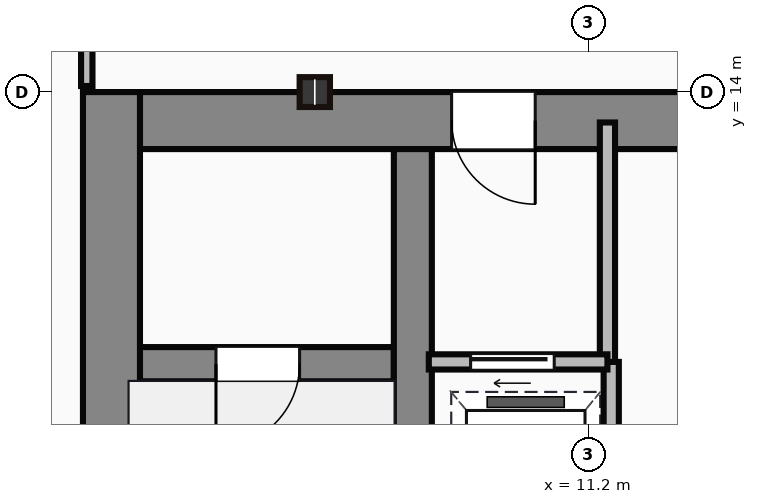
"""IFC4 building model, lengths in metres.
Left out: names, types, materials, properties, quantities, classifications, styles, units other than length and angle.
Written with IfcOpenShell. Run it as: python <this file> out.ifc"""

import sys

from ifc_helpers import new_model, si_unit, direction, frame, frame_2d, origin, origin_2d, place, context, subcontext, project, spatial, rectangle, i_section, extrude, source, transform, mapped, element, fill, save


model = new_model("IFC4")
c1 = context("Model", 3, precision=1e-05, world=origin(), true_north=direction((0.0, 1.0)))
c2 = subcontext(c1, "Body", "Model", "MODEL_VIEW")
j1 = project(units=[si_unit("LENGTHUNIT", "METRE"), si_unit("PLANEANGLEUNIT", "RADIAN")], contexts=[c1])
p1 = place(None, origin())
s1 = spatial("IfcSite", under=j1, at=p1, CompositionType="ELEMENT")
p2 = place(p1, origin())
s2 = spatial("IfcBuilding", under=s1, at=p2, CompositionType="ELEMENT")
p3 = place(p2, frame((0.0, 0.0, 106.9)))
s3 = spatial("IfcBuildingStorey", under=s2, at=p3, CompositionType="ELEMENT", Elevation=106.9)
m1 = source(origin(), c2, "Body", "SweptSolid", [
    extrude(rectangle(XDim=13.1, YDim=0.75, at=frame_2d((6.55, 0.0))), origin(), (0.0, 0.0, 1.0), 3.65),
])
p4 = place(p3, frame((4.925, 0.9, 0.0), z_axis=(0.0, 0.0, 1.0), x_axis=(0.0, 1.0, 0.0)))
e1 = element("IfcWall", 1, at=p4, inside=s3, PredefinedType="SHEAR", context=c2, shape_type="MappedRepresentation", body=[
    mapped(m1, transform((0.0, 0.0, 0.0))),
])
m2 = source(origin(), c2, "Body", "SweptSolid", [
    extrude(rectangle(XDim=9.1, YDim=0.75, at=frame_2d((4.55, 0.0))), origin(), (0.0, 0.0, 1.0), 3.65),
])
p5 = place(p3, frame((5.3, 13.625, 0.0), z_axis=(0.0, 0.0, 1.0), x_axis=(1.0, 0.0, 0.0)))
e2 = element("IfcWall", 2, at=p5, inside=s3, PredefinedType="SHEAR", context=c2, shape_type="MappedRepresentation", body=[
    mapped(m2, transform((0.0, 0.0, 0.0))),
])
p6 = place(p5, frame((4.1, 0.0, 0.0)))
e3 = element("IfcOpeningElement", 3, at=p6, cuts=e2, PredefinedType="OPENING", context=c2, shape_type="SweptSolid", body=[
    extrude(rectangle(XDim=1.1, YDim=2.15, at=frame_2d((0.55, 1.075))), frame((0.0, 0.385, 0.0), z_axis=(0.0, -1.0, 0.0), x_axis=(1.0, 0.0, 0.0)), (0.0, 0.0, 1.0), 0.77),
])
m3 = source(origin(), c2, "Body", "SweptSolid", [
    extrude(rectangle(XDim=12.35, YDim=0.5, at=frame_2d((6.175, 0.0))), origin(), (0.0, 0.0, 1.0), 3.65),
])
p7 = place(p3, frame((8.89, 0.9, 0.0), z_axis=(0.0, 0.0, 1.0), x_axis=(0.0, 1.0, 0.0)))
e4 = element("IfcWall", 4, at=p7, inside=s3, PredefinedType="SHEAR", context=c2, shape_type="MappedRepresentation", body=[
    mapped(m3, transform((0.0, 0.0, 0.0))),
])
m4 = source(origin(), c2, "Body", "SweptSolid", [
    extrude(rectangle(XDim=3.39, YDim=0.45, at=frame_2d((1.695, 0.0))), origin(), (0.0, 0.0, 1.0), 3.65),
])
p8 = place(p3, frame((5.25, 10.42, 0.0), z_axis=(0.0, 0.0, 1.0), x_axis=(1.0, 0.0, 0.0)))
e5 = element("IfcWall", 5, at=p8, inside=s3, PredefinedType="SHEAR", context=c2, shape_type="MappedRepresentation", body=[
    mapped(m4, transform((0.0, 0.0, 0.0))),
])
p9 = place(p8, frame((1.05, 0.0, 0.0)))
e6 = element("IfcOpeningElement", 6, at=p9, cuts=e5, PredefinedType="OPENING", context=c2, shape_type="SweptSolid", body=[
    extrude(rectangle(XDim=1.1, YDim=2.15, at=frame_2d((0.55, 1.075))), frame((0.0, 0.235, 0.0), z_axis=(0.0, -1.0, 0.0), x_axis=(1.0, 0.0, 0.0)), (0.0, 0.0, 1.0), 0.47),
])
m5 = source(origin(), c2, "Body", "SweptSolid", [
    extrude(i_section(OverallWidth=0.399, OverallDepth=0.393, WebThickness=0.023, FlangeThickness=0.037, at=origin_2d()), origin(), (0.0, 0.0, 1.0), 3.65),
])
p10 = place(p3, frame((7.6, 14.0, 0.0), z_axis=(0.0, 0.0, 1.0), x_axis=(1.0, 0.0, 0.0)))
e7 = element("IfcColumn", 7, at=p10, inside=s3, PredefinedType="COLUMN", context=c2, shape_type="MappedRepresentation", body=[
    mapped(m5, transform((0.0, 0.0, 0.0))),
])
m6 = source(origin(), c2, "Body", "SweptSolid", [
    extrude(rectangle(XDim=3.18, YDim=0.2, at=frame_2d((1.59, 0.0))), origin(), (0.0, 0.0, 1.0), 3.4),
])
p11 = place(p3, frame((11.45, 10.42, 0.0), z_axis=(0.0, 0.0, 1.0), x_axis=(0.0, 1.0, 0.0)))
e8 = element("IfcWall", 8, at=p11, inside=s3, PredefinedType="PARTITIONING", context=c2, shape_type="MappedRepresentation", body=[
    mapped(m6, transform((0.0, 0.0, 0.0))),
])
m7 = source(origin(), c2, "Body", "SweptSolid", [
    extrude(rectangle(XDim=2.35, YDim=0.2, at=frame_2d((1.175, 0.0))), origin(), (0.0, 0.0, 1.0), 3.4),
])
p12 = place(p3, frame((9.1, 10.45, 0.0), z_axis=(0.0, 0.0, 1.0), x_axis=(1.0, 0.0, 0.0)))
e9 = element("IfcWall", 9, at=p12, inside=s3, PredefinedType="PARTITIONING", context=c2, shape_type="MappedRepresentation", body=[
    mapped(m7, transform((0.0, 0.0, 0.0))),
])
p13 = place(p12, frame((0.55, 0.0, 0.0)))
e10 = element("IfcOpeningElement", 10, at=p13, cuts=e9, PredefinedType="OPENING", context=c2, shape_type="SweptSolid", body=[
    extrude(rectangle(XDim=1.1, YDim=2.15, at=frame_2d((0.55, 1.075))), frame((0.0, 0.11, 0.0), z_axis=(0.0, -1.0, 0.0), x_axis=(1.0, 0.0, 0.0)), (0.0, 0.0, 1.0), 0.22),
])
m8 = source(origin(), c2, "Body", "SweptSolid", [
    extrude(rectangle(XDim=9.6, YDim=0.2, at=frame_2d((4.8, 0.0))), origin(), (0.0, 0.0, 1.0), 3.4),
])
p14 = place(p3, frame((11.5, 0.85, 0.0), z_axis=(0.0, 0.0, 1.0), x_axis=(0.0, 1.0, 0.0)))
e11 = element("IfcWall", 11, at=p14, inside=s3, PredefinedType="PARTITIONING", context=c2, shape_type="MappedRepresentation", body=[
    mapped(m8, transform((0.0, 0.0, 0.0))),
])
p15 = place(p14, frame((4.2, 0.0, 0.0)))
e12 = element("IfcOpeningElement", 12, at=p15, cuts=e11, PredefinedType="OPENING", context=c2, shape_type="SweptSolid", body=[
    extrude(rectangle(XDim=1.1, YDim=2.15, at=frame_2d((0.55, 1.075))), frame((0.0, 0.11, 0.0), z_axis=(0.0, -1.0, 0.0), x_axis=(1.0, 0.0, 0.0)), (0.0, 0.0, 1.0), 0.22),
])
p16 = place(p14, frame((0.9, 0.0, 0.0)))
e13 = element("IfcOpeningElement", 13, at=p16, cuts=e11, PredefinedType="OPENING", context=c2, shape_type="SweptSolid", body=[
    extrude(rectangle(XDim=1.2, YDim=2.15, at=frame_2d((0.6, 1.075))), frame((0.0, 0.11, 0.0), z_axis=(0.0, -1.0, 0.0), x_axis=(1.0, 0.0, 0.0)), (0.0, 0.0, 1.0), 0.22),
])
m9 = source(origin(), c2, "Body", "SweptSolid", [
    extrude(rectangle(XDim=2.22, YDim=0.15, at=frame_2d((1.11, 0.0))), origin(), (0.0, 0.0, 1.0), 3.4),
])
p17 = place(p3, frame((4.6, 14.08, 0.0), z_axis=(0.0, 0.0, 1.0), x_axis=(0.0, 1.0, 0.0)))
e14 = element("IfcWall", 14, at=p17, inside=s3, PredefinedType="PARTITIONING", context=c2, shape_type="MappedRepresentation", body=[
    mapped(m9, transform((0.0, 0.0, 0.0))),
])
m10 = source(origin(), c2, "Body", "SweptSolid", [
    extrude(rectangle(XDim=1.1, YDim=2.15, at=frame_2d((0.55, 1.075))), frame((0.0, 0.025, 0.0), z_axis=(0.0, -1.0, 0.0), x_axis=(1.0, 0.0, 0.0)), (0.0, 0.0, 1.0), 0.05),
])
p18 = place(p9, frame((1.1, 0.0, 0.0), z_axis=(0.0, 0.0, 1.0), x_axis=(-1.0, 0.0, 0.0)))
e15 = element("IfcDoor", 15, at=p18, inside=s3, OperationType="SINGLE_SWING_LEFT", PredefinedType="DOOR", context=c2, shape_type="MappedRepresentation", body=[
    mapped(m10, transform((0.0, 0.0, 0.0))),
])
fill(e6, e15)
p19 = place(p6, origin())
e16 = element("IfcDoor", 16, at=p19, inside=s3, OperationType="SINGLE_SWING_RIGHT", PredefinedType="DOOR", context=c2, shape_type="MappedRepresentation", body=[
    mapped(m10, transform((0.0, 0.0, 0.0))),
])
fill(e3, e16)
p20 = place(p13, origin())
e17 = element("IfcDoor", 17, at=p20, inside=s3, OperationType="SLIDING_TO_LEFT", PredefinedType="DOOR", context=c2, shape_type="MappedRepresentation", body=[
    mapped(m10, transform((0.0, 0.0, 0.0))),
])
fill(e10, e17)
save(model, sys.argv[1])
